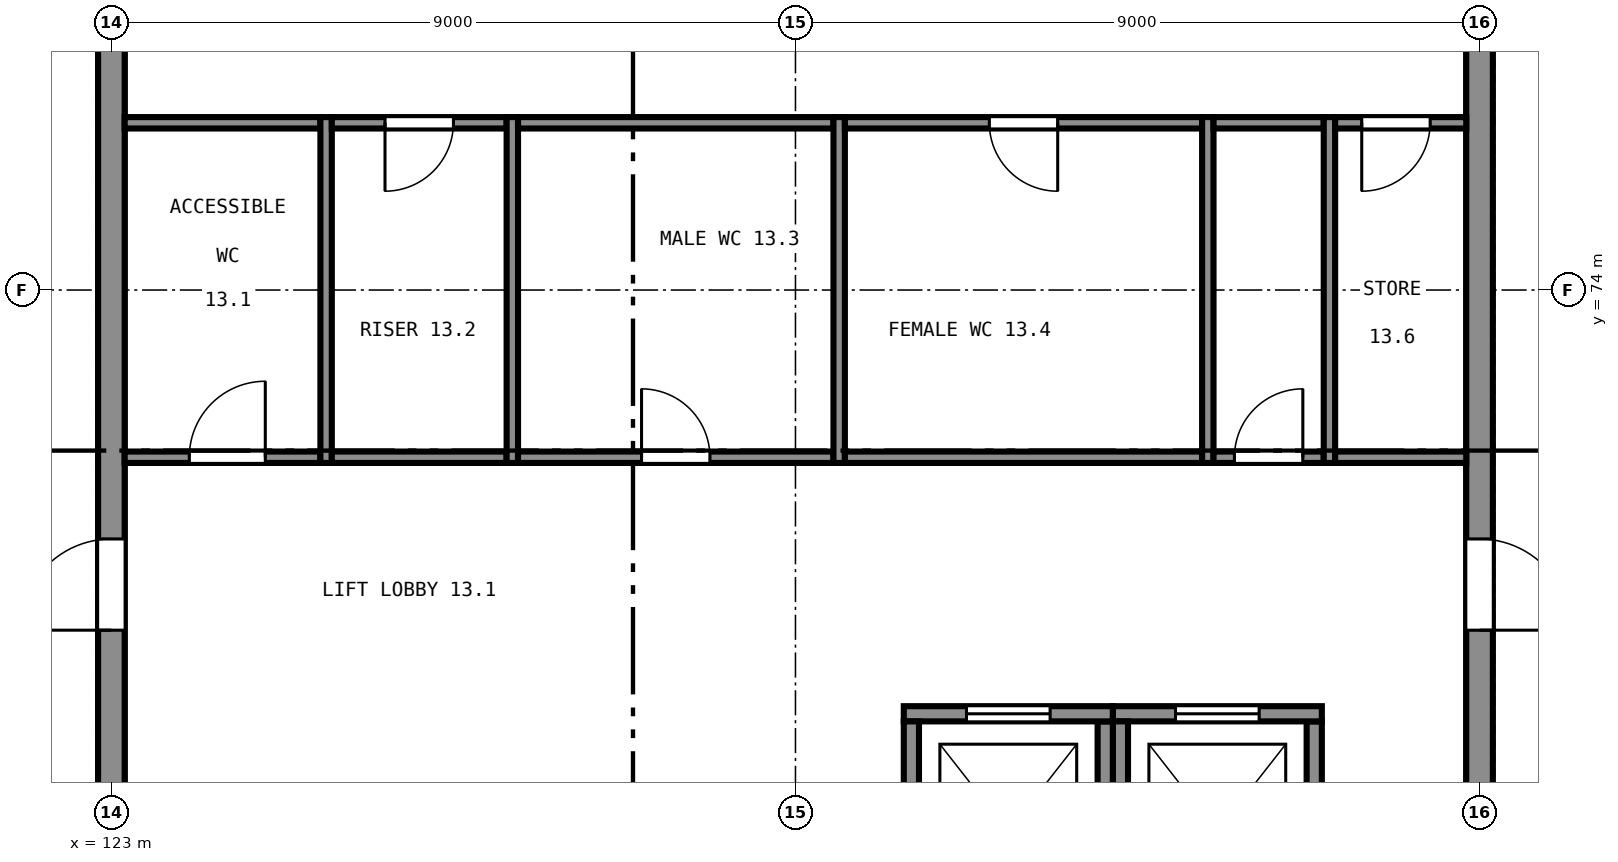
"""IFC4 building model, lengths in metres.
Left out: names, types, materials, properties, quantities, classifications, styles, units other than length and angle.
Written with IfcOpenShell. Run it as: python <this file> out.ifc"""

import sys

from ifc_helpers import new_model, si_unit, direction, frame, frame_2d, origin, place, context, subcontext, project, spatial, rectangle, extrude, element, fill, save


model = new_model("IFC4")
c1 = context("Model", 3, precision=1e-05, world=origin(), true_north=direction((0.0, 1.0)))
c2 = subcontext(c1, "Body", "Model", "MODEL_VIEW")
j1 = project(units=[si_unit("LENGTHUNIT", "METRE"), si_unit("PLANEANGLEUNIT", "RADIAN")], contexts=[c1])
p1 = place(None, origin())
s1 = spatial("IfcSite", under=j1, at=p1, CompositionType="ELEMENT")
p2 = place(p1, origin())
s2 = spatial("IfcBuilding", under=s1, at=p2, CompositionType="ELEMENT")
p3 = place(p2, frame((0.0, 0.0, 53.5)))
s3 = spatial("IfcBuildingStorey", under=s2, at=p3, CompositionType="ELEMENT", Elevation=53.5)
p4 = place(p3, frame((141.0, 65.175, 0.0), z_axis=(0.0, 0.0, 1.0), x_axis=(0.0, 1.0, 0.0)))
e1 = element("IfcWall", 1, at=p4, inside=s3, PredefinedType="SHEAR", context=c2, shape_type="SweptSolid", body=[
    extrude(rectangle(XDim=17.65, YDim=0.35, at=frame_2d((8.825, 0.0))), origin(), (0.0, 0.0, 1.0), 4.0),
])
p5 = place(p4, frame((4.35, 0.0, 0.0)))
e2 = element("IfcOpeningElement", 2, at=p5, cuts=e1, PredefinedType="OPENING", context=c2, shape_type="SweptSolid", body=[
    extrude(rectangle(XDim=1.2, YDim=2.1, at=frame_2d((0.6, 1.05))), frame((0.0, 0.185, 0.0), z_axis=(0.0, -1.0, 0.0), x_axis=(1.0, 0.0, 0.0)), (0.0, 0.0, 1.0), 0.37),
])
p6 = place(p4, frame((12.1, 0.0, 0.0)))
e3 = element("IfcOpeningElement", 3, at=p6, cuts=e1, PredefinedType="OPENING", context=c2, shape_type="SweptSolid", body=[
    extrude(rectangle(XDim=1.2, YDim=2.1, at=frame_2d((0.6, 1.05))), frame((0.0, 0.185, 0.0), z_axis=(0.0, -1.0, 0.0), x_axis=(1.0, 0.0, 0.0)), (0.0, 0.0, 1.0), 0.37),
])
p7 = place(p3, frame((123.0, 82.825, 0.0), z_axis=(0.0, 0.0, 1.0), x_axis=(0.0, -1.0, 0.0)))
e4 = element("IfcWall", 4, at=p7, inside=s3, PredefinedType="SHEAR", context=c2, shape_type="SweptSolid", body=[
    extrude(rectangle(XDim=17.65, YDim=0.35, at=frame_2d((8.825, 0.0))), origin(), (0.0, 0.0, 1.0), 4.0),
])
p8 = place(p7, frame((12.1, 0.0, 0.0)))
e5 = element("IfcOpeningElement", 5, at=p8, cuts=e4, PredefinedType="OPENING", context=c2, shape_type="SweptSolid", body=[
    extrude(rectangle(XDim=1.2, YDim=2.1, at=frame_2d((0.6, 1.05))), frame((0.0, 0.185, 0.0), z_axis=(0.0, -1.0, 0.0), x_axis=(1.0, 0.0, 0.0)), (0.0, 0.0, 1.0), 0.37),
])
p9 = place(p7, frame((4.35, 0.0, 0.0)))
e6 = element("IfcOpeningElement", 6, at=p9, cuts=e4, PredefinedType="OPENING", context=c2, shape_type="SweptSolid", body=[
    extrude(rectangle(XDim=1.2, YDim=2.1, at=frame_2d((0.6, 1.05))), frame((0.0, 0.185, 0.0), z_axis=(0.0, -1.0, 0.0), x_axis=(1.0, 0.0, 0.0)), (0.0, 0.0, 1.0), 0.37),
])
p10 = place(p3, frame((136.075, 65.425, 0.0), z_axis=(0.0, 0.0, 1.0), x_axis=(0.0, 1.0, 0.0)))
e7 = element("IfcWall", 7, at=p10, inside=s3, PredefinedType="SHEAR", context=c2, shape_type="SweptSolid", body=[
    extrude(rectangle(XDim=2.9, YDim=0.2, at=frame_2d((1.45, 0.0))), origin(), (0.0, 0.0, 1.0), 4.0),
])
p11 = place(p3, frame((136.175, 68.425, 0.0), z_axis=(0.0, 0.0, 1.0), x_axis=(-1.0, 0.0, 0.0)))
e8 = element("IfcWall", 8, at=p11, inside=s3, PredefinedType="SHEAR", context=c2, shape_type="SweptSolid", body=[
    extrude(rectangle(XDim=2.75, YDim=0.2, at=frame_2d((1.375, 0.0))), origin(), (0.0, 0.0, 1.0), 4.0),
])
p12 = place(p11, frame((0.825, 0.0, 0.0)))
e9 = element("IfcOpeningElement", 9, at=p12, cuts=e8, PredefinedType="OPENING", context=c2, shape_type="SweptSolid", body=[
    extrude(rectangle(XDim=1.1, YDim=2.1, at=frame_2d((0.55, 1.05))), frame((0.0, 0.11, 0.0), z_axis=(0.0, -1.0, 0.0), x_axis=(1.0, 0.0, 0.0)), (0.0, 0.0, 1.0), 0.22),
])
for number, where, z_axis, x_axis in (
    (10, (133.525, 68.325, 0.0), (0.0, 0.0, 1.0), (0.0, -1.0, 0.0)),
    (11, (138.825, 65.425, 0.0), (0.0, 0.0, 1.0), (0.0, 1.0, 0.0)),
):
    element("IfcWall", number, at=place(p3, frame(where, z_axis=z_axis, x_axis=x_axis)), inside=s3, PredefinedType="SHEAR", context=c2, shape_type="SweptSolid", body=[
        extrude(rectangle(XDim=2.9, YDim=0.2, at=frame_2d((1.45, 0.0))), origin(), (0.0, 0.0, 1.0), 4.0),
    ])
p13 = place(p3, frame((138.925, 68.425, 0.0), z_axis=(0.0, 0.0, 1.0), x_axis=(-1.0, 0.0, 0.0)))
e12 = element("IfcWall", 12, at=p13, inside=s3, PredefinedType="SHEAR", context=c2, shape_type="SweptSolid", body=[
    extrude(rectangle(XDim=2.75, YDim=0.2, at=frame_2d((1.375, 0.0))), origin(), (0.0, 0.0, 1.0), 4.0),
])
p14 = place(p13, frame((0.825, 0.0, 0.0)))
e13 = element("IfcOpeningElement", 13, at=p14, cuts=e12, PredefinedType="OPENING", context=c2, shape_type="SweptSolid", body=[
    extrude(rectangle(XDim=1.1, YDim=2.1, at=frame_2d((0.55, 1.05))), frame((0.0, 0.11, 0.0), z_axis=(0.0, -1.0, 0.0), x_axis=(1.0, 0.0, 0.0)), (0.0, 0.0, 1.0), 0.22),
])
p15 = place(p3, frame((136.275, 68.325, 0.0), z_axis=(0.0, 0.0, 1.0), x_axis=(0.0, -1.0, 0.0)))
e14 = element("IfcWall", 14, at=p15, inside=s3, PredefinedType="SHEAR", context=c2, shape_type="SweptSolid", body=[
    extrude(rectangle(XDim=2.9, YDim=0.2, at=frame_2d((1.45, 0.0))), origin(), (0.0, 0.0, 1.0), 4.0),
])
p16 = place(p3, frame((125.825, 71.725, 0.0), z_axis=(0.0, 0.0, 1.0), x_axis=(0.0, 1.0, 0.0)))
e15 = element("IfcWall", 15, at=p16, inside=s3, PredefinedType="PARTITIONING", context=c2, shape_type="SweptSolid", body=[
    extrude(rectangle(XDim=4.55, YDim=0.15, at=frame_2d((2.275, 0.0))), origin(), (0.0, 0.0, 1.0), 3.75),
])
p17 = place(p3, frame((123.175, 71.8, 0.0), z_axis=(0.0, 0.0, 1.0), x_axis=(1.0, 0.0, 0.0)))
e16 = element("IfcWall", 16, at=p17, inside=s3, PredefinedType="PARTITIONING", context=c2, shape_type="SweptSolid", body=[
    extrude(rectangle(XDim=2.575, YDim=0.15, at=frame_2d((1.288, 0.0))), origin(), (0.0, 0.0, 1.0), 3.75),
])
p18 = place(p17, frame((0.85, 0.0, 0.0)))
e17 = element("IfcOpeningElement", 17, at=p18, cuts=e16, PredefinedType="OPENING", context=c2, shape_type="SweptSolid", body=[
    extrude(rectangle(XDim=1.0, YDim=2.1, at=frame_2d((0.5, 1.05))), frame((0.0, 0.085, 0.0), z_axis=(0.0, -1.0, 0.0), x_axis=(1.0, 0.0, 0.0)), (0.0, 0.0, 1.0), 0.17),
])
p19 = place(p3, frame((123.175, 76.2, 0.0), z_axis=(0.0, 0.0, 1.0), x_axis=(1.0, 0.0, 0.0)))
e18 = element("IfcWall", 18, at=p19, inside=s3, PredefinedType="PARTITIONING", context=c2, shape_type="SweptSolid", body=[
    extrude(rectangle(XDim=2.575, YDim=0.15, at=frame_2d((1.288, 0.0))), origin(), (0.0, 0.0, 1.0), 3.75),
])
p20 = place(p3, frame((128.275, 71.725, 0.0), z_axis=(0.0, 0.0, 1.0), x_axis=(0.0, 1.0, 0.0)))
e19 = element("IfcWall", 19, at=p20, inside=s3, PredefinedType="PARTITIONING", context=c2, shape_type="SweptSolid", body=[
    extrude(rectangle(XDim=4.55, YDim=0.15, at=frame_2d((2.275, 0.0))), origin(), (0.0, 0.0, 1.0), 3.75),
])
p21 = place(p3, frame((125.9, 71.8, 0.0), z_axis=(0.0, 0.0, 1.0), x_axis=(1.0, 0.0, 0.0)))
e20 = element("IfcWall", 20, at=p21, inside=s3, PredefinedType="PARTITIONING", context=c2, shape_type="SweptSolid", body=[
    extrude(rectangle(XDim=2.3, YDim=0.15, at=frame_2d((1.15, 0.0))), origin(), (0.0, 0.0, 1.0), 3.75),
])
p22 = place(p3, frame((125.9, 76.2, 0.0), z_axis=(0.0, 0.0, 1.0), x_axis=(1.0, 0.0, 0.0)))
e21 = element("IfcWall", 21, at=p22, inside=s3, PredefinedType="PARTITIONING", context=c2, shape_type="SweptSolid", body=[
    extrude(rectangle(XDim=2.3, YDim=0.15, at=frame_2d((1.15, 0.0))), origin(), (0.0, 0.0, 1.0), 3.75),
])
p23 = place(p22, frame((0.7, 0.0, 0.0)))
e22 = element("IfcOpeningElement", 22, at=p23, cuts=e21, PredefinedType="OPENING", context=c2, shape_type="SweptSolid", body=[
    extrude(rectangle(XDim=0.9, YDim=2.1, at=frame_2d((0.45, 1.05))), frame((0.0, 0.085, 0.0), z_axis=(0.0, -1.0, 0.0), x_axis=(1.0, 0.0, 0.0)), (0.0, 0.0, 1.0), 0.17),
])
p24 = place(p3, frame((132.575, 71.725, 0.0), z_axis=(0.0, 0.0, 1.0), x_axis=(0.0, 1.0, 0.0)))
e23 = element("IfcWall", 23, at=p24, inside=s3, PredefinedType="PARTITIONING", context=c2, shape_type="SweptSolid", body=[
    extrude(rectangle(XDim=4.55, YDim=0.15, at=frame_2d((2.275, 0.0))), origin(), (0.0, 0.0, 1.0), 3.75),
])
p25 = place(p3, frame((128.35, 71.8, 0.0), z_axis=(0.0, 0.0, 1.0), x_axis=(1.0, 0.0, 0.0)))
e24 = element("IfcWall", 24, at=p25, inside=s3, PredefinedType="PARTITIONING", context=c2, shape_type="SweptSolid", body=[
    extrude(rectangle(XDim=4.15, YDim=0.15, at=frame_2d((2.075, 0.0))), origin(), (0.0, 0.0, 1.0), 3.75),
])
p26 = place(p25, frame((1.625, 0.0, 0.0)))
e25 = element("IfcOpeningElement", 25, at=p26, cuts=e24, PredefinedType="OPENING", context=c2, shape_type="SweptSolid", body=[
    extrude(rectangle(XDim=0.9, YDim=2.1, at=frame_2d((0.45, 1.05))), frame((0.0, 0.085, 0.0), z_axis=(0.0, -1.0, 0.0), x_axis=(1.0, 0.0, 0.0)), (0.0, 0.0, 1.0), 0.17),
])
p27 = place(p3, frame((128.35, 76.2, 0.0), z_axis=(0.0, 0.0, 1.0), x_axis=(1.0, 0.0, 0.0)))
e26 = element("IfcWall", 26, at=p27, inside=s3, PredefinedType="PARTITIONING", context=c2, shape_type="SweptSolid", body=[
    extrude(rectangle(XDim=4.15, YDim=0.15, at=frame_2d((2.075, 0.0))), origin(), (0.0, 0.0, 1.0), 3.75),
])
p28 = place(p3, frame((137.425, 71.725, 0.0), z_axis=(0.0, 0.0, 1.0), x_axis=(0.0, 1.0, 0.0)))
e27 = element("IfcWall", 27, at=p28, inside=s3, PredefinedType="PARTITIONING", context=c2, shape_type="SweptSolid", body=[
    extrude(rectangle(XDim=4.55, YDim=0.15, at=frame_2d((2.275, 0.0))), origin(), (0.0, 0.0, 1.0), 3.75),
])
p29 = place(p3, frame((132.65, 71.8, 0.0), z_axis=(0.0, 0.0, 1.0), x_axis=(1.0, 0.0, 0.0)))
e28 = element("IfcWall", 28, at=p29, inside=s3, PredefinedType="PARTITIONING", context=c2, shape_type="SweptSolid", body=[
    extrude(rectangle(XDim=4.7, YDim=0.15, at=frame_2d((2.35, 0.0))), origin(), (0.0, 0.0, 1.0), 3.75),
])
p30 = place(p3, frame((132.65, 76.2, 0.0), z_axis=(0.0, 0.0, 1.0), x_axis=(1.0, 0.0, 0.0)))
e29 = element("IfcWall", 29, at=p30, inside=s3, PredefinedType="PARTITIONING", context=c2, shape_type="SweptSolid", body=[
    extrude(rectangle(XDim=4.7, YDim=0.15, at=frame_2d((2.35, 0.0))), origin(), (0.0, 0.0, 1.0), 3.75),
])
p31 = place(p30, frame((1.9, 0.0, 0.0)))
e30 = element("IfcOpeningElement", 30, at=p31, cuts=e29, PredefinedType="OPENING", context=c2, shape_type="SweptSolid", body=[
    extrude(rectangle(XDim=0.9, YDim=2.1, at=frame_2d((0.45, 1.05))), frame((0.0, 0.085, 0.0), z_axis=(0.0, -1.0, 0.0), x_axis=(1.0, 0.0, 0.0)), (0.0, 0.0, 1.0), 0.17),
])
p32 = place(p3, frame((139.025, 71.725, 0.0), z_axis=(0.0, 0.0, 1.0), x_axis=(0.0, 1.0, 0.0)))
e31 = element("IfcWall", 31, at=p32, inside=s3, PredefinedType="PARTITIONING", context=c2, shape_type="SweptSolid", body=[
    extrude(rectangle(XDim=4.55, YDim=0.15, at=frame_2d((2.275, 0.0))), origin(), (0.0, 0.0, 1.0), 3.75),
])
p33 = place(p3, frame((137.5, 71.8, 0.0), z_axis=(0.0, 0.0, 1.0), x_axis=(1.0, 0.0, 0.0)))
e32 = element("IfcWall", 32, at=p33, inside=s3, PredefinedType="PARTITIONING", context=c2, shape_type="SweptSolid", body=[
    extrude(rectangle(XDim=1.45, YDim=0.15, at=frame_2d((0.725, 0.0))), origin(), (0.0, 0.0, 1.0), 3.75),
])
p34 = place(p33, frame((0.275, 0.0, 0.0)))
e33 = element("IfcOpeningElement", 33, at=p34, cuts=e32, PredefinedType="OPENING", context=c2, shape_type="SweptSolid", body=[
    extrude(rectangle(XDim=0.9, YDim=2.1, at=frame_2d((0.45, 1.05))), frame((0.0, 0.085, 0.0), z_axis=(0.0, -1.0, 0.0), x_axis=(1.0, 0.0, 0.0)), (0.0, 0.0, 1.0), 0.17),
])
p35 = place(p3, frame((137.5, 76.2, 0.0), z_axis=(0.0, 0.0, 1.0), x_axis=(1.0, 0.0, 0.0)))
e34 = element("IfcWall", 34, at=p35, inside=s3, PredefinedType="PARTITIONING", context=c2, shape_type="SweptSolid", body=[
    extrude(rectangle(XDim=1.45, YDim=0.15, at=frame_2d((0.725, 0.0))), origin(), (0.0, 0.0, 1.0), 3.75),
])
p36 = place(p3, frame((139.1, 71.8, 0.0), z_axis=(0.0, 0.0, 1.0), x_axis=(1.0, 0.0, 0.0)))
e35 = element("IfcWall", 35, at=p36, inside=s3, PredefinedType="PARTITIONING", context=c2, shape_type="SweptSolid", body=[
    extrude(rectangle(XDim=1.725, YDim=0.15, at=frame_2d((0.862, 0.0))), origin(), (0.0, 0.0, 1.0), 3.75),
])
p37 = place(p3, frame((139.1, 76.2, 0.0), z_axis=(0.0, 0.0, 1.0), x_axis=(1.0, 0.0, 0.0)))
e36 = element("IfcWall", 36, at=p37, inside=s3, PredefinedType="PARTITIONING", context=c2, shape_type="SweptSolid", body=[
    extrude(rectangle(XDim=1.725, YDim=0.15, at=frame_2d((0.862, 0.0))), origin(), (0.0, 0.0, 1.0), 3.75),
])
p38 = place(p37, frame((0.35, 0.0, 0.0)))
e37 = element("IfcOpeningElement", 37, at=p38, cuts=e36, PredefinedType="OPENING", context=c2, shape_type="SweptSolid", body=[
    extrude(rectangle(XDim=0.9, YDim=2.1, at=frame_2d((0.45, 1.05))), frame((0.0, 0.085, 0.0), z_axis=(0.0, -1.0, 0.0), x_axis=(1.0, 0.0, 0.0)), (0.0, 0.0, 1.0), 0.17),
])
p39 = place(p12, origin())
e38 = element("IfcDoor", 38, at=p39, inside=s3, OperationType="SLIDING_TO_LEFT", PredefinedType="DOOR", context=c2, shape_type="SweptSolid", body=[
    extrude(rectangle(XDim=1.1, YDim=2.1, at=frame_2d((0.55, 1.05))), frame((0.0, 0.025, 0.0), z_axis=(0.0, -1.0, 0.0), x_axis=(1.0, 0.0, 0.0)), (0.0, 0.0, 1.0), 0.05),
])
fill(e9, e38)
p40 = place(p14, origin())
e39 = element("IfcDoor", 39, at=p40, inside=s3, OperationType="SLIDING_TO_LEFT", PredefinedType="DOOR", context=c2, shape_type="SweptSolid", body=[
    extrude(rectangle(XDim=1.1, YDim=2.1, at=frame_2d((0.55, 1.05))), frame((0.0, 0.025, 0.0), z_axis=(0.0, -1.0, 0.0), x_axis=(1.0, 0.0, 0.0)), (0.0, 0.0, 1.0), 0.05),
])
fill(e13, e39)
p41 = place(p8, frame((1.2, 0.0, 0.0), z_axis=(0.0, 0.0, 1.0), x_axis=(-1.0, 0.0, 0.0)))
e40 = element("IfcDoor", 40, at=p41, inside=s3, OperationType="SINGLE_SWING_RIGHT", PredefinedType="DOOR", context=c2, shape_type="SweptSolid", body=[
    extrude(rectangle(XDim=1.2, YDim=2.1, at=frame_2d((0.6, 1.05))), frame((0.0, 0.025, 0.0), z_axis=(0.0, -1.0, 0.0), x_axis=(1.0, 0.0, 0.0)), (0.0, 0.0, 1.0), 0.05),
])
fill(e5, e40)
p42 = place(p5, frame((1.2, 0.0, 0.0), z_axis=(0.0, 0.0, 1.0), x_axis=(-1.0, 0.0, 0.0)))
e41 = element("IfcDoor", 41, at=p42, inside=s3, OperationType="SINGLE_SWING_LEFT", PredefinedType="DOOR", context=c2, shape_type="SweptSolid", body=[
    extrude(rectangle(XDim=1.2, YDim=2.1, at=frame_2d((0.6, 1.05))), frame((0.0, 0.025, 0.0), z_axis=(0.0, -1.0, 0.0), x_axis=(1.0, 0.0, 0.0)), (0.0, 0.0, 1.0), 0.05),
])
fill(e2, e41)
p43 = place(p18, origin())
e42 = element("IfcDoor", 42, at=p43, inside=s3, OperationType="SINGLE_SWING_LEFT", PredefinedType="DOOR", context=c2, shape_type="SweptSolid", body=[
    extrude(rectangle(XDim=1.0, YDim=2.1, at=frame_2d((0.5, 1.05))), frame((0.0, 0.025, 0.0), z_axis=(0.0, -1.0, 0.0), x_axis=(1.0, 0.0, 0.0)), (0.0, 0.0, 1.0), 0.05),
])
fill(e17, e42)
p44 = place(p23, frame((0.9, 0.0, 0.0), z_axis=(0.0, 0.0, 1.0), x_axis=(-1.0, 0.0, 0.0)))
e43 = element("IfcDoor", 43, at=p44, inside=s3, OperationType="SINGLE_SWING_LEFT", PredefinedType="DOOR", context=c2, shape_type="SweptSolid", body=[
    extrude(rectangle(XDim=0.9, YDim=2.1, at=frame_2d((0.45, 1.05))), frame((0.0, 0.025, 0.0), z_axis=(0.0, -1.0, 0.0), x_axis=(1.0, 0.0, 0.0)), (0.0, 0.0, 1.0), 0.05),
])
fill(e22, e43)
p45 = place(p26, origin())
e44 = element("IfcDoor", 44, at=p45, inside=s3, OperationType="SINGLE_SWING_RIGHT", PredefinedType="DOOR", context=c2, shape_type="SweptSolid", body=[
    extrude(rectangle(XDim=0.9, YDim=2.1, at=frame_2d((0.45, 1.05))), frame((0.0, 0.025, 0.0), z_axis=(0.0, -1.0, 0.0), x_axis=(1.0, 0.0, 0.0)), (0.0, 0.0, 1.0), 0.05),
])
fill(e25, e44)
p46 = place(p31, frame((0.9, 0.0, 0.0), z_axis=(0.0, 0.0, 1.0), x_axis=(-1.0, 0.0, 0.0)))
e45 = element("IfcDoor", 45, at=p46, inside=s3, OperationType="SINGLE_SWING_RIGHT", PredefinedType="DOOR", context=c2, shape_type="SweptSolid", body=[
    extrude(rectangle(XDim=0.9, YDim=2.1, at=frame_2d((0.45, 1.05))), frame((0.0, 0.025, 0.0), z_axis=(0.0, -1.0, 0.0), x_axis=(1.0, 0.0, 0.0)), (0.0, 0.0, 1.0), 0.05),
])
fill(e30, e45)
p47 = place(p34, origin())
e46 = element("IfcDoor", 46, at=p47, inside=s3, OperationType="SINGLE_SWING_LEFT", PredefinedType="DOOR", context=c2, shape_type="SweptSolid", body=[
    extrude(rectangle(XDim=0.9, YDim=2.1, at=frame_2d((0.45, 1.05))), frame((0.0, 0.025, 0.0), z_axis=(0.0, -1.0, 0.0), x_axis=(1.0, 0.0, 0.0)), (0.0, 0.0, 1.0), 0.05),
])
fill(e33, e46)
p48 = place(p38, frame((0.9, 0.0, 0.0), z_axis=(0.0, 0.0, 1.0), x_axis=(-1.0, 0.0, 0.0)))
e47 = element("IfcDoor", 47, at=p48, inside=s3, OperationType="SINGLE_SWING_LEFT", PredefinedType="DOOR", context=c2, shape_type="SweptSolid", body=[
    extrude(rectangle(XDim=0.9, YDim=2.1, at=frame_2d((0.45, 1.05))), frame((0.0, 0.025, 0.0), z_axis=(0.0, -1.0, 0.0), x_axis=(1.0, 0.0, 0.0)), (0.0, 0.0, 1.0), 0.05),
])
fill(e37, e47)
save(model, sys.argv[1])
